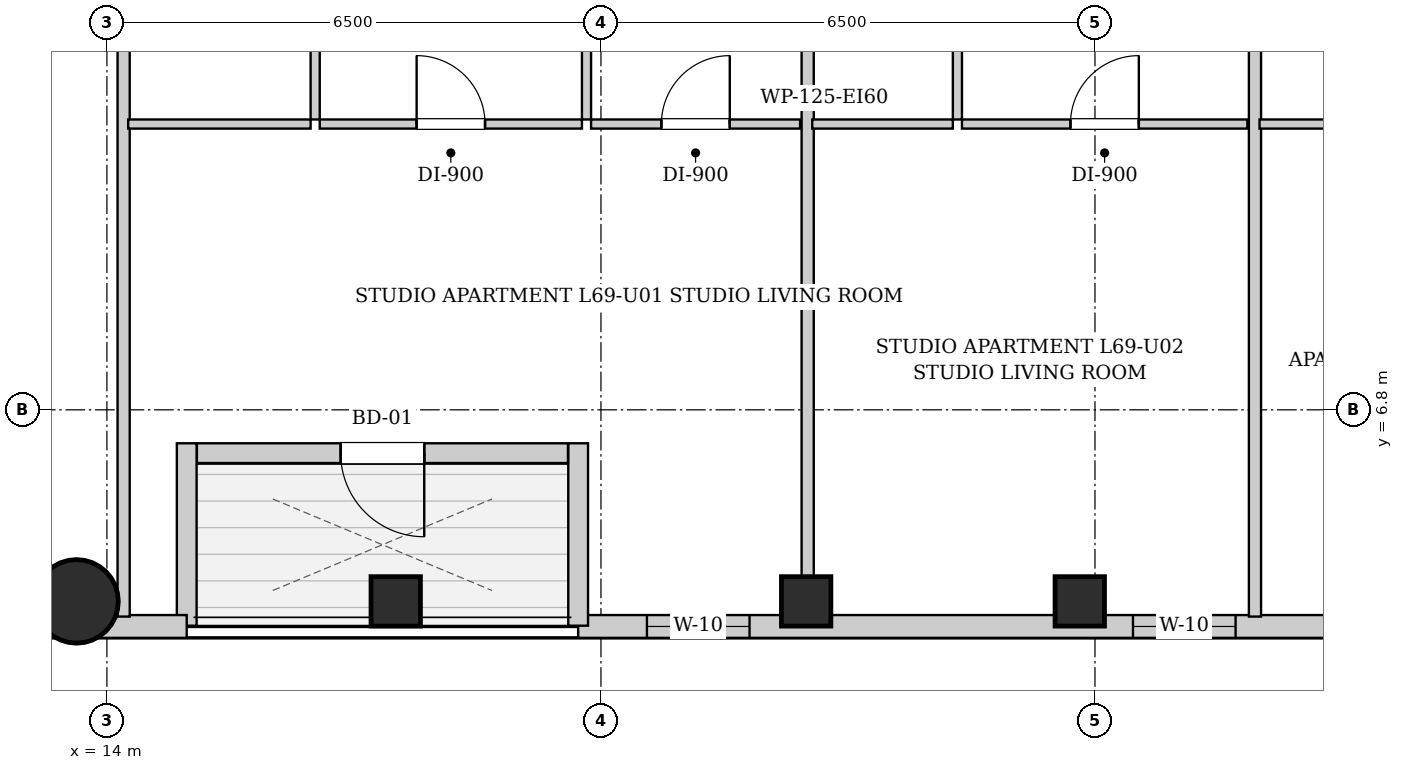
"""IFC4 building model, lengths in metres.
Left out: names, types, materials, properties, quantities, classifications, styles, units other than length and angle.
Written with IfcOpenShell. Run it as: python <this file> out.ifc"""

import sys

from ifc_helpers import new_model, si_unit, direction, frame, frame_2d, origin, origin_2d, place, context, subcontext, project, spatial, rectangle, circle, extrude, element, fill, save


model = new_model("IFC4")
c1 = context("Model", 3, precision=1e-05, world=origin(), true_north=direction((0.0, 1.0)))
c2 = subcontext(c1, "Body", "Model", "MODEL_VIEW")
j1 = project(units=[si_unit("LENGTHUNIT", "METRE"), si_unit("PLANEANGLEUNIT", "RADIAN")], contexts=[c1])
p1 = place(None, origin())
s1 = spatial("IfcSite", under=j1, at=p1, CompositionType="ELEMENT")
p2 = place(p1, origin())
s2 = spatial("IfcBuilding", under=s1, at=p2, CompositionType="ELEMENT")
p3 = place(p2, frame((0.0, 0.0, 237.7)))
s3 = spatial("IfcBuildingStorey", under=s2, at=p3, CompositionType="ELEMENT", Elevation=237.7)
p4 = place(p3, frame((13.6, 4.28, 0.0), z_axis=(0.0, 0.0, 1.0), x_axis=(1.0, 0.0, 0.0)))
e1 = element("IfcColumn", 1, at=p4, inside=s3, PredefinedType="COLUMN", context=c2, shape_type="SweptSolid", body=[
    extrude(circle(Radius=0.55, at=origin_2d()), origin(), (0.0, 0.0, 1.0), 3.4),
])
for number, where, z_axis, x_axis in (
    (2, (17.8, 4.28, 0.0), (0.0, 0.0, 1.0), (1.0, 0.0, 0.0)),
    (3, (23.2, 4.28, 0.0), (0.0, 0.0, 1.0), (1.0, 0.0, 0.0)),
    (4, (26.8, 4.28, 0.0), (0.0, 0.0, 1.0), (1.0, 0.0, 0.0)),
):
    element("IfcColumn", number, at=place(p3, frame(where, z_axis=z_axis, x_axis=x_axis)), inside=s3, PredefinedType="COLUMN", context=c2, shape_type="SweptSolid", body=[
        extrude(rectangle(XDim=0.65, YDim=0.65, at=origin_2d()), origin(), (0.0, 0.0, 1.0), 3.4),
    ])
p5 = place(p3, frame((37.8, 3.95, 0.0), z_axis=(0.0, 0.0, 1.0), x_axis=(-1.0, 0.0, 0.0)))
e5 = element("IfcWall", 5, at=p5, inside=s3, PredefinedType="SOLIDWALL", context=c2, shape_type="SweptSolid", body=[
    extrude(rectangle(XDim=17.6, YDim=0.3, at=frame_2d((8.8, 0.0))), origin(), (0.0, 0.0, 1.0), 3.14),
])
p6 = place(p5, frame((15.345, 0.0, 0.55)))
e6 = element("IfcOpeningElement", 6, at=p6, cuts=e5, PredefinedType="OPENING", context=c2, shape_type="SweptSolid", body=[
    extrude(rectangle(XDim=1.35, YDim=1.2, at=frame_2d((0.675, 0.6))), frame((0.0, 0.16, 0.0), z_axis=(0.0, -1.0, 0.0), x_axis=(1.0, 0.0, 0.0)), (0.0, 0.0, 1.0), 0.32),
])
p7 = place(p5, frame((8.95, 0.0, 0.55)))
e7 = element("IfcOpeningElement", 7, at=p7, cuts=e5, PredefinedType="OPENING", context=c2, shape_type="SweptSolid", body=[
    extrude(rectangle(XDim=1.35, YDim=1.2, at=frame_2d((0.675, 0.6))), frame((0.0, 0.16, 0.0), z_axis=(0.0, -1.0, 0.0), x_axis=(1.0, 0.0, 0.0)), (0.0, 0.0, 1.0), 0.32),
])
p8 = place(p5, frame((5.085, 0.0, 0.55)))
e8 = element("IfcOpeningElement", 8, at=p8, cuts=e5, PredefinedType="OPENING", context=c2, shape_type="SweptSolid", body=[
    extrude(rectangle(XDim=1.35, YDim=1.2, at=frame_2d((0.675, 0.6))), frame((0.0, 0.16, 0.0), z_axis=(0.0, -1.0, 0.0), x_axis=(1.0, 0.0, 0.0)), (0.0, 0.0, 1.0), 0.32),
])
p9 = place(p5, frame((2.757, 0.0, 0.55)))
e9 = element("IfcOpeningElement", 9, at=p9, cuts=e5, PredefinedType="OPENING", context=c2, shape_type="SweptSolid", body=[
    extrude(rectangle(XDim=1.35, YDim=1.2, at=frame_2d((0.675, 0.6))), frame((0.0, 0.16, 0.0), z_axis=(0.0, -1.0, 0.0), x_axis=(1.0, 0.0, 0.0)), (0.0, 0.0, 1.0), 0.32),
])
p10 = place(p3, frame((20.2, 3.96, 0.0), z_axis=(0.0, 0.0, 1.0), x_axis=(0.0, 1.0, 0.0)))
e10 = element("IfcWall", 10, at=p10, inside=s3, PredefinedType="SOLIDWALL", context=c2, shape_type="SweptSolid", body=[
    extrude(rectangle(XDim=2.4, YDim=0.26, at=frame_2d((1.2, 0.0))), origin(), (0.0, 0.0, 1.0), 3.14),
])
p11 = place(p3, frame((20.066, 6.23, 0.0), z_axis=(0.0, 0.0, 1.0), x_axis=(-1.0, 0.0, 0.0)))
e11 = element("IfcWall", 11, at=p11, inside=s3, PredefinedType="SOLIDWALL", context=c2, shape_type="SweptSolid", body=[
    extrude(rectangle(XDim=4.882, YDim=0.26, at=frame_2d((2.441, 0.0))), origin(), (0.0, 0.0, 1.0), 3.14),
])
p12 = place(p11, frame((1.891, 0.0, 0.0)))
e12 = element("IfcOpeningElement", 12, at=p12, cuts=e11, PredefinedType="OPENING", context=c2, shape_type="SweptSolid", body=[
    extrude(rectangle(XDim=1.1, YDim=2.0, at=frame_2d((0.55, 1.0))), frame((0.0, 0.14, 0.0), z_axis=(0.0, -1.0, 0.0), x_axis=(1.0, 0.0, 0.0)), (0.0, 0.0, 1.0), 0.28),
])
p13 = place(p3, frame((15.05, 6.36, 0.0), z_axis=(0.0, 0.0, 1.0), x_axis=(0.0, -1.0, 0.0)))
e13 = element("IfcWall", 13, at=p13, inside=s3, PredefinedType="SOLIDWALL", context=c2, shape_type="SweptSolid", body=[
    extrude(rectangle(XDim=2.4, YDim=0.26, at=frame_2d((1.2, 0.0))), origin(), (0.0, 0.0, 1.0), 3.14),
])
p14 = place(p3, frame((15.05, 3.95, 0.0), z_axis=(0.0, 0.0, 1.0), x_axis=(-1.0, 0.0, 0.0)))
e14 = element("IfcWall", 14, at=p14, inside=s3, PredefinedType="SOLIDWALL", context=c2, shape_type="SweptSolid", body=[
    extrude(rectangle(XDim=1.95, YDim=0.3, at=frame_2d((0.975, 0.0))), origin(), (0.0, 0.0, 1.0), 3.14),
])
p15 = place(p3, frame((14.22, 4.08, 0.0), z_axis=(0.0, 0.0, 1.0), x_axis=(0.0, 1.0, 0.0)))
e15 = element("IfcWall", 15, at=p15, inside=s3, PredefinedType="PARTITIONING", context=c2, shape_type="SweptSolid", body=[
    extrude(rectangle(XDim=9.39, YDim=0.16, at=frame_2d((4.695, 0.0))), origin(), (0.0, 0.0, 1.0), 3.14),
])
p16 = place(p3, frame((16.74, 10.62, 0.0), z_axis=(0.0, 0.0, 1.0), x_axis=(0.0, 1.0, 0.0)))
e16 = element("IfcWall", 16, at=p16, inside=s3, PredefinedType="PARTITIONING", context=c2, shape_type="SweptSolid", body=[
    extrude(rectangle(XDim=2.85, YDim=0.12, at=frame_2d((1.425, 0.0))), origin(), (0.0, 0.0, 1.0), 3.14),
])
p17 = place(p16, frame((0.995, 0.0, 0.0)))
e17 = element("IfcOpeningElement", 17, at=p17, cuts=e16, PredefinedType="OPENING", context=c2, shape_type="SweptSolid", body=[
    extrude(rectangle(XDim=0.86, YDim=2.05, at=frame_2d((0.43, 1.025))), frame((0.0, 0.07, 0.0), z_axis=(0.0, -1.0, 0.0), x_axis=(1.0, 0.0, 0.0)), (0.0, 0.0, 1.0), 0.14),
])
p18 = place(p3, frame((14.28, 10.56, 0.0), z_axis=(0.0, 0.0, 1.0), x_axis=(1.0, 0.0, 0.0)))
e18 = element("IfcWall", 18, at=p18, inside=s3, PredefinedType="PARTITIONING", context=c2, shape_type="SweptSolid", body=[
    extrude(rectangle(XDim=2.4, YDim=0.12, at=frame_2d((1.2, 0.0))), origin(), (0.0, 0.0, 1.0), 3.14),
])
p19 = place(p3, frame((20.31, 10.62, 0.0), z_axis=(0.0, 0.0, 1.0), x_axis=(0.0, 1.0, 0.0)))
e19 = element("IfcWall", 19, at=p19, inside=s3, PredefinedType="PARTITIONING", context=c2, shape_type="SweptSolid", body=[
    extrude(rectangle(XDim=2.85, YDim=0.12, at=frame_2d((1.425, 0.0))), origin(), (0.0, 0.0, 1.0), 3.14),
])
p20 = place(p19, frame((0.975, 0.0, 0.0)))
e20 = element("IfcOpeningElement", 20, at=p20, cuts=e19, PredefinedType="OPENING", context=c2, shape_type="SweptSolid", body=[
    extrude(rectangle(XDim=0.9, YDim=2.05, at=frame_2d((0.45, 1.025))), frame((0.0, 0.07, 0.0), z_axis=(0.0, -1.0, 0.0), x_axis=(1.0, 0.0, 0.0)), (0.0, 0.0, 1.0), 0.14),
])
p21 = place(p3, frame((16.8, 10.56, 0.0), z_axis=(0.0, 0.0, 1.0), x_axis=(1.0, 0.0, 0.0)))
e21 = element("IfcWall", 21, at=p21, inside=s3, PredefinedType="PARTITIONING", context=c2, shape_type="SweptSolid", body=[
    extrude(rectangle(XDim=3.45, YDim=0.12, at=frame_2d((1.725, 0.0))), origin(), (0.0, 0.0, 1.0), 3.14),
])
p22 = place(p21, frame((1.275, 0.0, 0.0)))
e22 = element("IfcOpeningElement", 22, at=p22, cuts=e21, PredefinedType="OPENING", context=c2, shape_type="SweptSolid", body=[
    extrude(rectangle(XDim=0.9, YDim=2.05, at=frame_2d((0.45, 1.025))), frame((0.0, 0.07, 0.0), z_axis=(0.0, -1.0, 0.0), x_axis=(1.0, 0.0, 0.0)), (0.0, 0.0, 1.0), 0.14),
])
p23 = place(p3, frame((20.37, 10.56, 0.0), z_axis=(0.0, 0.0, 1.0), x_axis=(1.0, 0.0, 0.0)))
e23 = element("IfcWall", 23, at=p23, inside=s3, PredefinedType="PARTITIONING", context=c2, shape_type="SweptSolid", body=[
    extrude(rectangle(XDim=2.75, YDim=0.12, at=frame_2d((1.375, 0.0))), origin(), (0.0, 0.0, 1.0), 3.14),
])
p24 = place(p23, frame((0.925, 0.0, 0.0)))
e24 = element("IfcOpeningElement", 24, at=p24, cuts=e23, PredefinedType="OPENING", context=c2, shape_type="SweptSolid", body=[
    extrude(rectangle(XDim=0.9, YDim=2.05, at=frame_2d((0.45, 1.025))), frame((0.0, 0.07, 0.0), z_axis=(0.0, -1.0, 0.0), x_axis=(1.0, 0.0, 0.0)), (0.0, 0.0, 1.0), 0.14),
])
p25 = place(p3, frame((23.22, 4.08, 0.0), z_axis=(0.0, 0.0, 1.0), x_axis=(0.0, 1.0, 0.0)))
e25 = element("IfcWall", 25, at=p25, inside=s3, PredefinedType="PARTITIONING", context=c2, shape_type="SweptSolid", body=[
    extrude(rectangle(XDim=9.39, YDim=0.16, at=frame_2d((4.695, 0.0))), origin(), (0.0, 0.0, 1.0), 3.14),
])
p26 = place(p3, frame((25.19, 10.62, 0.0), z_axis=(0.0, 0.0, 1.0), x_axis=(0.0, 1.0, 0.0)))
e26 = element("IfcWall", 26, at=p26, inside=s3, PredefinedType="PARTITIONING", context=c2, shape_type="SweptSolid", body=[
    extrude(rectangle(XDim=2.85, YDim=0.12, at=frame_2d((1.425, 0.0))), origin(), (0.0, 0.0, 1.0), 3.14),
])
p27 = place(p26, frame((0.995, 0.0, 0.0)))
e27 = element("IfcOpeningElement", 27, at=p27, cuts=e26, PredefinedType="OPENING", context=c2, shape_type="SweptSolid", body=[
    extrude(rectangle(XDim=0.86, YDim=2.05, at=frame_2d((0.43, 1.025))), frame((0.0, 0.07, 0.0), z_axis=(0.0, -1.0, 0.0), x_axis=(1.0, 0.0, 0.0)), (0.0, 0.0, 1.0), 0.14),
])
p28 = place(p3, frame((23.28, 10.56, 0.0), z_axis=(0.0, 0.0, 1.0), x_axis=(1.0, 0.0, 0.0)))
e28 = element("IfcWall", 28, at=p28, inside=s3, PredefinedType="PARTITIONING", context=c2, shape_type="SweptSolid", body=[
    extrude(rectangle(XDim=1.85, YDim=0.12, at=frame_2d((0.925, 0.0))), origin(), (0.0, 0.0, 1.0), 3.14),
])
p29 = place(p3, frame((25.25, 10.56, 0.0), z_axis=(0.0, 0.0, 1.0), x_axis=(1.0, 0.0, 0.0)))
e29 = element("IfcWall", 29, at=p29, inside=s3, PredefinedType="PARTITIONING", context=c2, shape_type="SweptSolid", body=[
    extrude(rectangle(XDim=3.755, YDim=0.12, at=frame_2d((1.877, 0.0))), origin(), (0.0, 0.0, 1.0), 3.14),
])
p30 = place(p29, frame((1.427, 0.0, 0.0)))
e30 = element("IfcOpeningElement", 30, at=p30, cuts=e29, PredefinedType="OPENING", context=c2, shape_type="SweptSolid", body=[
    extrude(rectangle(XDim=0.9, YDim=2.05, at=frame_2d((0.45, 1.025))), frame((0.0, 0.07, 0.0), z_axis=(0.0, -1.0, 0.0), x_axis=(1.0, 0.0, 0.0)), (0.0, 0.0, 1.0), 0.14),
])
p31 = place(p3, frame((29.105, 4.08, 0.0), z_axis=(0.0, 0.0, 1.0), x_axis=(0.0, 1.0, 0.0)))
e31 = element("IfcWall", 31, at=p31, inside=s3, PredefinedType="PARTITIONING", context=c2, shape_type="SweptSolid", body=[
    extrude(rectangle(XDim=9.39, YDim=0.16, at=frame_2d((4.695, 0.0))), origin(), (0.0, 0.0, 1.0), 3.14),
])
p32 = place(p3, frame((29.165, 10.56, 0.0), z_axis=(0.0, 0.0, 1.0), x_axis=(1.0, 0.0, 0.0)))
e32 = element("IfcWall", 32, at=p32, inside=s3, PredefinedType="PARTITIONING", context=c2, shape_type="SweptSolid", body=[
    extrude(rectangle(XDim=2.4, YDim=0.12, at=frame_2d((1.2, 0.0))), origin(), (0.0, 0.0, 1.0), 3.14),
])
p33 = place(p22, origin())
e33 = element("IfcDoor", 33, at=p33, inside=s3, OperationType="SINGLE_SWING_LEFT", PredefinedType="DOOR", context=c2, shape_type="SweptSolid", body=[
    extrude(rectangle(XDim=0.9, YDim=2.05, at=frame_2d((0.45, 1.025))), frame((0.0, 0.025, 0.0), z_axis=(0.0, -1.0, 0.0), x_axis=(1.0, 0.0, 0.0)), (0.0, 0.0, 1.0), 0.05),
])
fill(e22, e33)
p34 = place(p24, origin())
e34 = element("IfcDoor", 34, at=p34, inside=s3, OperationType="SINGLE_SWING_RIGHT", PredefinedType="DOOR", context=c2, shape_type="SweptSolid", body=[
    extrude(rectangle(XDim=0.9, YDim=2.05, at=frame_2d((0.45, 1.025))), frame((0.0, 0.025, 0.0), z_axis=(0.0, -1.0, 0.0), x_axis=(1.0, 0.0, 0.0)), (0.0, 0.0, 1.0), 0.05),
])
fill(e24, e34)
p35 = place(p30, origin())
e35 = element("IfcDoor", 35, at=p35, inside=s3, OperationType="SINGLE_SWING_RIGHT", PredefinedType="DOOR", context=c2, shape_type="SweptSolid", body=[
    extrude(rectangle(XDim=0.9, YDim=2.05, at=frame_2d((0.45, 1.025))), frame((0.0, 0.025, 0.0), z_axis=(0.0, -1.0, 0.0), x_axis=(1.0, 0.0, 0.0)), (0.0, 0.0, 1.0), 0.05),
])
fill(e30, e35)
p36 = place(p12, origin())
e36 = element("IfcDoor", 36, at=p36, inside=s3, OperationType="SINGLE_SWING_LEFT", PredefinedType="DOOR", context=c2, shape_type="SweptSolid", body=[
    extrude(rectangle(XDim=1.1, YDim=2.0, at=frame_2d((0.55, 1.0))), frame((0.0, 0.025, 0.0), z_axis=(0.0, -1.0, 0.0), x_axis=(1.0, 0.0, 0.0)), (0.0, 0.0, 1.0), 0.05),
])
fill(e12, e36)
p37 = place(p6, origin())
e37 = element("IfcWindow", 37, at=p37, inside=s3, PartitioningType="SINGLE_PANEL", PredefinedType="WINDOW", context=c2, shape_type="SweptSolid", body=[
    extrude(rectangle(XDim=1.35, YDim=1.2, at=frame_2d((0.675, 0.6))), frame((0.0, 0.03, 0.0), z_axis=(0.0, -1.0, 0.0), x_axis=(1.0, 0.0, 0.0)), (0.0, 0.0, 1.0), 0.06),
])
fill(e6, e37)
p38 = place(p7, origin())
e38 = element("IfcWindow", 38, at=p38, inside=s3, PartitioningType="SINGLE_PANEL", PredefinedType="WINDOW", context=c2, shape_type="SweptSolid", body=[
    extrude(rectangle(XDim=1.35, YDim=1.2, at=frame_2d((0.675, 0.6))), frame((0.0, 0.03, 0.0), z_axis=(0.0, -1.0, 0.0), x_axis=(1.0, 0.0, 0.0)), (0.0, 0.0, 1.0), 0.06),
])
fill(e7, e38)
save(model, sys.argv[1])
